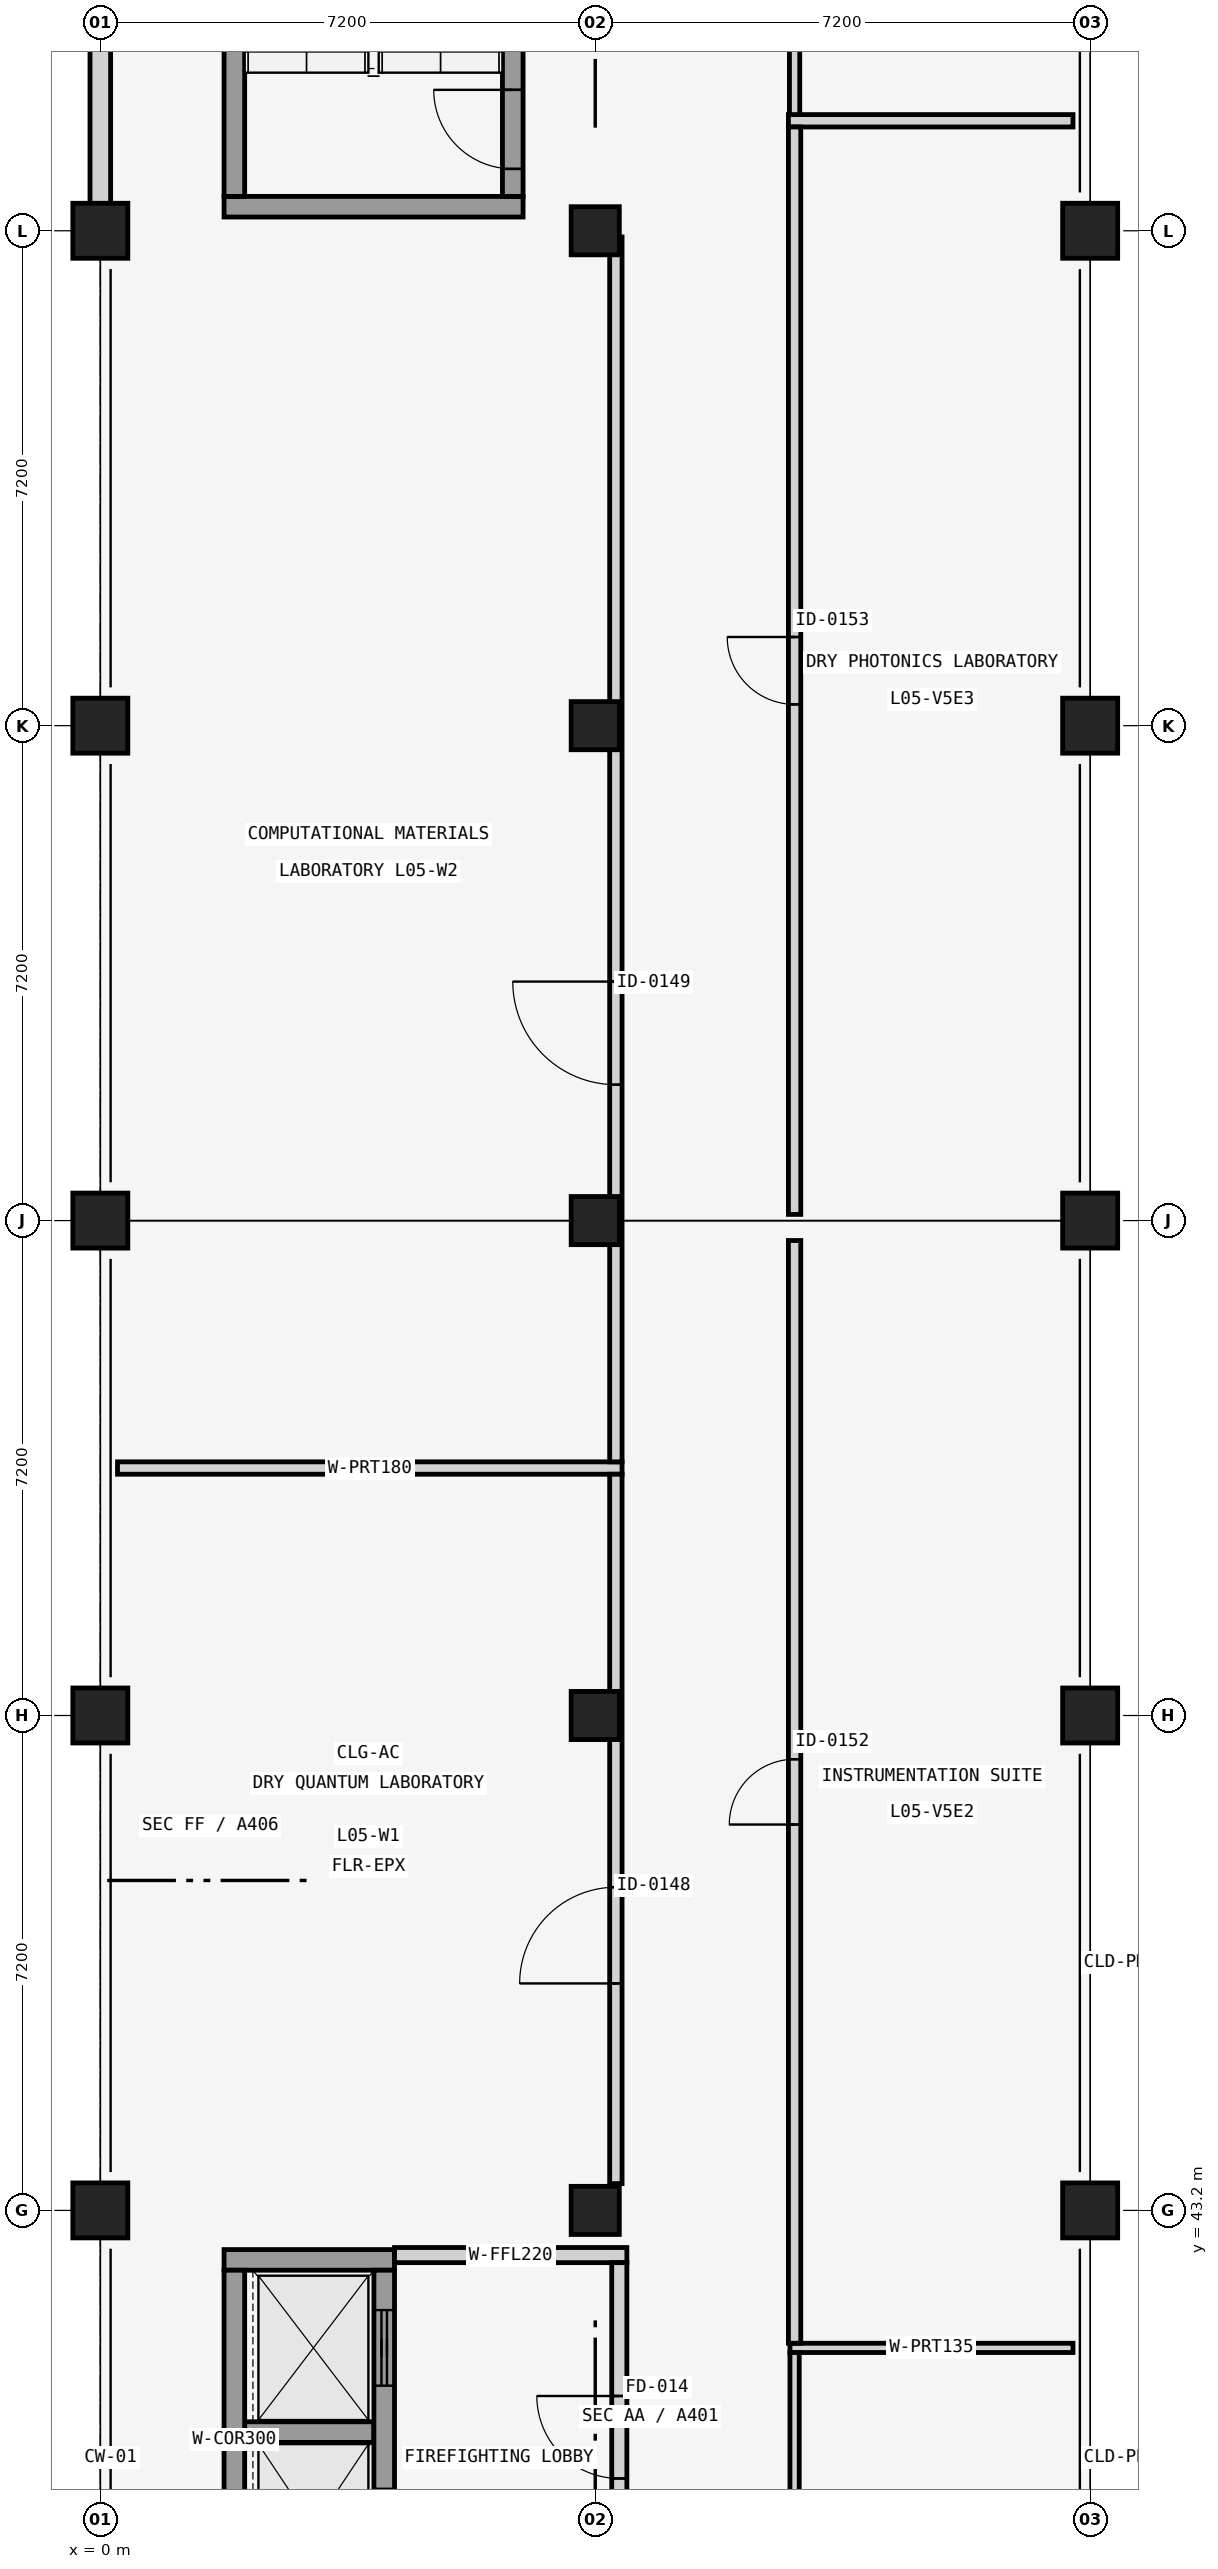
"""IFC4 building model, lengths in metres.
Left out: names, types, materials, properties, quantities, classifications, styles, units other than length and angle.
Written with IfcOpenShell. Run it as: python <this file> out.ifc"""

import sys

from ifc_helpers import new_model, si_unit, direction, frame, frame_2d, origin, origin_2d, place, context, subcontext, project, spatial, rectangle, extrude, element, fill, save


model = new_model("IFC4")
c1 = context("Model", 3, precision=1e-05, world=origin(), true_north=direction((0.0, 1.0)))
c2 = subcontext(c1, "Body", "Model", "MODEL_VIEW")
j1 = project(units=[si_unit("LENGTHUNIT", "METRE"), si_unit("PLANEANGLEUNIT", "RADIAN")], contexts=[c1])
p1 = place(None, origin())
s1 = spatial("IfcSite", under=j1, at=p1, CompositionType="ELEMENT")
p2 = place(p1, origin())
s2 = spatial("IfcBuilding", under=s1, at=p2, CompositionType="ELEMENT")
p3 = place(p2, frame((0.0, 0.0, 21.44)))
s3 = spatial("IfcBuildingStorey", under=s2, at=p3, CompositionType="ELEMENT", Elevation=21.44)
for number, where, z_axis, x_axis in (
    (1, (0.0, 43.2, 0.0), (0.0, 0.0, 1.0), (1.0, 0.0, 0.0)),
    (2, (0.0, 50.4, 0.0), (0.0, 0.0, 1.0), (1.0, 0.0, 0.0)),
    (3, (0.0, 57.6, 0.0), (0.0, 0.0, 1.0), (1.0, 0.0, 0.0)),
    (4, (0.0, 64.8, 0.0), (0.0, 0.0, 1.0), (1.0, 0.0, 0.0)),
    (5, (0.0, 72.0, 0.0), (0.0, 0.0, 1.0), (1.0, 0.0, 0.0)),
):
    element("IfcColumn", number, at=place(p3, frame(where, z_axis=z_axis, x_axis=x_axis)), inside=s3, PredefinedType="COLUMN", context=c2, shape_type="SweptSolid", body=[
        extrude(rectangle(XDim=0.8, YDim=0.8, at=origin_2d()), origin(), (0.0, 0.0, 1.0), 4.16),
    ])
for number, where, z_axis, x_axis in (
    (6, (7.2, 43.2, 0.0), (0.0, 0.0, 1.0), (1.0, 0.0, 0.0)),
    (7, (7.2, 50.4, 0.0), (0.0, 0.0, 1.0), (1.0, 0.0, 0.0)),
    (8, (7.2, 57.6, 0.0), (0.0, 0.0, 1.0), (1.0, 0.0, 0.0)),
    (9, (7.2, 64.8, 0.0), (0.0, 0.0, 1.0), (1.0, 0.0, 0.0)),
    (10, (7.2, 72.0, 0.0), (0.0, 0.0, 1.0), (1.0, 0.0, 0.0)),
):
    element("IfcColumn", number, at=place(p3, frame(where, z_axis=z_axis, x_axis=x_axis)), inside=s3, PredefinedType="COLUMN", context=c2, shape_type="SweptSolid", body=[
        extrude(rectangle(XDim=0.7, YDim=0.7, at=origin_2d()), origin(), (0.0, 0.0, 1.0), 4.16),
    ])
for number, where, z_axis, x_axis in (
    (11, (14.4, 43.2, 0.0), (0.0, 0.0, 1.0), (1.0, 0.0, 0.0)),
    (12, (14.4, 50.4, 0.0), (0.0, 0.0, 1.0), (1.0, 0.0, 0.0)),
    (13, (14.4, 57.6, 0.0), (0.0, 0.0, 1.0), (1.0, 0.0, 0.0)),
    (14, (14.4, 64.8, 0.0), (0.0, 0.0, 1.0), (1.0, 0.0, 0.0)),
    (15, (14.4, 72.0, 0.0), (0.0, 0.0, 1.0), (1.0, 0.0, 0.0)),
):
    element("IfcColumn", number, at=place(p3, frame(where, z_axis=z_axis, x_axis=x_axis)), inside=s3, PredefinedType="COLUMN", context=c2, shape_type="SweptSolid", body=[
        extrude(rectangle(XDim=0.8, YDim=0.8, at=origin_2d()), origin(), (0.0, 0.0, 1.0), 4.16),
    ])
p4 = place(p3, frame((0.0, 72.39, 0.0), z_axis=(0.0, 0.0, 1.0), x_axis=(0.0, 1.0, 0.0)))
e16 = element("IfcWall", 16, at=p4, inside=s3, PredefinedType="SOLIDWALL", context=c2, shape_type="SweptSolid", body=[
    extrude(rectangle(XDim=6.42, YDim=0.3, at=frame_2d((3.21, 0.0))), origin(), (0.0, 0.0, 1.0), 3.21),
])
p5 = place(p4, frame((2.985, 0.0, 0.65)))
e17 = element("IfcOpeningElement", 17, at=p5, cuts=e16, PredefinedType="OPENING", context=c2, shape_type="SweptSolid", body=[
    extrude(rectangle(XDim=0.45, YDim=2.4, at=frame_2d((0.225, 1.2))), frame((0.0, 0.16, 0.0), z_axis=(0.0, -1.0, 0.0), x_axis=(1.0, 0.0, 0.0)), (0.0, 0.0, 1.0), 0.32),
])
p6 = place(p3, frame((1.8, 42.48, 0.0), z_axis=(0.0, 0.0, 1.0), x_axis=(1.0, 0.0, 0.0)))
e18 = element("IfcWall", 18, at=p6, inside=s3, PredefinedType="SHEAR", context=c2, shape_type="SweptSolid", body=[
    extrude(rectangle(XDim=2.48, YDim=0.3, at=frame_2d((1.24, 0.0))), origin(), (0.0, 0.0, 1.0), 3.81),
])
p7 = place(p3, frame((2.1, 39.975, 0.0), z_axis=(0.0, 0.0, 1.0), x_axis=(1.0, 0.0, 0.0)))
e19 = element("IfcWall", 19, at=p7, inside=s3, PredefinedType="SHEAR", context=c2, shape_type="SweptSolid", body=[
    extrude(rectangle(XDim=1.88, YDim=0.3, at=frame_2d((0.94, 0.0))), origin(), (0.0, 0.0, 1.0), 3.81),
])
p8 = place(p3, frame((1.95, 37.4, 0.0), z_axis=(0.0, 0.0, 1.0), x_axis=(0.0, 1.0, 0.0)))
e20 = element("IfcWall", 20, at=p8, inside=s3, PredefinedType="SHEAR", context=c2, shape_type="SweptSolid", body=[
    extrude(rectangle(XDim=4.93, YDim=0.3, at=frame_2d((2.465, 0.0))), origin(), (0.0, 0.0, 1.0), 3.81),
])
p9 = place(p3, frame((4.13, 37.4, 0.0), z_axis=(0.0, 0.0, 1.0), x_axis=(0.0, 1.0, 0.0)))
e21 = element("IfcWall", 21, at=p9, inside=s3, PredefinedType="SHEAR", context=c2, shape_type="SweptSolid", body=[
    extrude(rectangle(XDim=4.93, YDim=0.3, at=frame_2d((2.465, 0.0))), origin(), (0.0, 0.0, 1.0), 3.81),
])
p10 = place(p9, frame((0.65, 0.0, 0.0)))
e22 = element("IfcOpeningElement", 22, at=p10, cuts=e21, PredefinedType="OPENING", context=c2, shape_type="SweptSolid", body=[
    extrude(rectangle(XDim=1.1, YDim=2.2, at=frame_2d((0.55, 1.1))), frame((0.0, 0.16, 0.0), z_axis=(0.0, -1.0, 0.0), x_axis=(1.0, 0.0, 0.0)), (0.0, 0.0, 1.0), 0.32),
])
p11 = place(p9, frame((3.25, 0.0, 0.0)))
e23 = element("IfcOpeningElement", 23, at=p11, cuts=e21, PredefinedType="OPENING", context=c2, shape_type="SweptSolid", body=[
    extrude(rectangle(XDim=1.1, YDim=2.2, at=frame_2d((0.55, 1.1))), frame((0.0, 0.16, 0.0), z_axis=(0.0, -1.0, 0.0), x_axis=(1.0, 0.0, 0.0)), (0.0, 0.0, 1.0), 0.32),
])
p12 = place(p3, frame((4.28, 42.55, 0.0), z_axis=(0.0, 0.0, 1.0), x_axis=(1.0, 0.0, 0.0)))
e24 = element("IfcWall", 24, at=p12, inside=s3, PredefinedType="SOLIDWALL", context=c2, shape_type="SweptSolid", body=[
    extrude(rectangle(XDim=3.38, YDim=0.22, at=frame_2d((1.69, 0.0))), origin(), (0.0, 0.0, 1.0), 3.01),
])
p13 = place(p3, frame((7.55, 37.36, 0.0), z_axis=(0.0, 0.0, 1.0), x_axis=(0.0, 1.0, 0.0)))
e25 = element("IfcWall", 25, at=p13, inside=s3, PredefinedType="SOLIDWALL", context=c2, shape_type="SweptSolid", body=[
    extrude(rectangle(XDim=5.08, YDim=0.22, at=frame_2d((2.54, 0.0))), origin(), (0.0, 0.0, 1.0), 3.51),
])
p14 = place(p13, frame((1.94, 0.0, 0.0)))
e26 = element("IfcOpeningElement", 26, at=p14, cuts=e25, PredefinedType="OPENING", context=c2, shape_type="SweptSolid", body=[
    extrude(rectangle(XDim=1.2, YDim=2.2, at=frame_2d((0.6, 1.1))), frame((0.0, 0.12, 0.0), z_axis=(0.0, -1.0, 0.0), x_axis=(1.0, 0.0, 0.0)), (0.0, 0.0, 1.0), 0.24),
])
p15 = place(p3, frame((1.8, 72.35, 0.0), z_axis=(0.0, 0.0, 1.0), x_axis=(1.0, 0.0, 0.0)))
e27 = element("IfcWall", 27, at=p15, inside=s3, PredefinedType="SHEAR", context=c2, shape_type="SweptSolid", body=[
    extrude(rectangle(XDim=4.35, YDim=0.3, at=frame_2d((2.175, 0.0))), origin(), (0.0, 0.0, 1.0), 3.81),
])
p16 = place(p3, frame((1.95, 72.5, 0.0), z_axis=(0.0, 0.0, 1.0), x_axis=(0.0, 1.0, 0.0)))
e28 = element("IfcWall", 28, at=p16, inside=s3, PredefinedType="SHEAR", context=c2, shape_type="SweptSolid", body=[
    extrude(rectangle(XDim=7.8, YDim=0.3, at=frame_2d((3.9, 0.0))), origin(), (0.0, 0.0, 1.0), 3.81),
])
p17 = place(p3, frame((6.0, 72.5, 0.0), z_axis=(0.0, 0.0, 1.0), x_axis=(0.0, 1.0, 0.0)))
e29 = element("IfcWall", 29, at=p17, inside=s3, PredefinedType="SHEAR", context=c2, shape_type="SweptSolid", body=[
    extrude(rectangle(XDim=7.8, YDim=0.3, at=frame_2d((3.9, 0.0))), origin(), (0.0, 0.0, 1.0), 3.81),
])
p18 = place(p17, frame((0.4, 0.0, 0.0)))
e30 = element("IfcOpeningElement", 30, at=p18, cuts=e29, PredefinedType="OPENING", context=c2, shape_type="SweptSolid", body=[
    extrude(rectangle(XDim=1.15, YDim=2.2, at=frame_2d((0.575, 1.1))), frame((0.0, 0.16, 0.0), z_axis=(0.0, -1.0, 0.0), x_axis=(1.0, 0.0, 0.0)), (0.0, 0.0, 1.0), 0.32),
])
p19 = place(p3, frame((0.25, 54.0, 0.0), z_axis=(0.0, 0.0, 1.0), x_axis=(1.0, 0.0, 0.0)))
e31 = element("IfcWall", 31, at=p19, inside=s3, PredefinedType="PARTITIONING", context=c2, shape_type="SweptSolid", body=[
    extrude(rectangle(XDim=7.34, YDim=0.18, at=frame_2d((3.67, 0.0))), origin(), (0.0, 0.0, 1.0), 3.01),
])
p20 = place(p3, frame((7.5, 43.59, 0.0), z_axis=(0.0, 0.0, 1.0), x_axis=(0.0, 1.0, 0.0)))
e32 = element("IfcWall", 32, at=p20, inside=s3, PredefinedType="PARTITIONING", context=c2, shape_type="SweptSolid", body=[
    extrude(rectangle(XDim=10.32, YDim=0.18, at=frame_2d((5.16, 0.0))), origin(), (0.0, 0.0, 1.0), 3.21),
])
p21 = place(p20, frame((2.912, 0.0, 0.0)))
e33 = element("IfcOpeningElement", 33, at=p21, cuts=e32, PredefinedType="OPENING", context=c2, shape_type="SweptSolid", body=[
    extrude(rectangle(XDim=1.4, YDim=2.2, at=frame_2d((0.7, 1.1))), frame((0.0, 0.1, 0.0), z_axis=(0.0, -1.0, 0.0), x_axis=(1.0, 0.0, 0.0)), (0.0, 0.0, 1.0), 0.2),
])
p22 = place(p3, frame((7.5, 54.09, 0.0), z_axis=(0.0, 0.0, 1.0), x_axis=(0.0, 1.0, 0.0)))
e34 = element("IfcWall", 34, at=p22, inside=s3, PredefinedType="PARTITIONING", context=c2, shape_type="SweptSolid", body=[
    extrude(rectangle(XDim=17.82, YDim=0.18, at=frame_2d((8.91, 0.0))), origin(), (0.0, 0.0, 1.0), 3.21),
])
p23 = place(p22, frame((5.487, 0.0, 0.0)))
e35 = element("IfcOpeningElement", 35, at=p23, cuts=e34, PredefinedType="OPENING", context=c2, shape_type="SweptSolid", body=[
    extrude(rectangle(XDim=1.5, YDim=2.2, at=frame_2d((0.75, 1.1))), frame((0.0, 0.1, 0.0), z_axis=(0.0, -1.0, 0.0), x_axis=(1.0, 0.0, 0.0)), (0.0, 0.0, 1.0), 0.2),
])
p24 = place(p3, frame((10.032, 41.2, 0.0), z_axis=(0.0, 0.0, 1.0), x_axis=(1.0, 0.0, 0.0)))
e36 = element("IfcWall", 36, at=p24, inside=s3, PredefinedType="PARTITIONING", context=c2, shape_type="SweptSolid", body=[
    extrude(rectangle(XDim=4.117, YDim=0.135, at=frame_2d((2.059, 0.0))), origin(), (0.0, 0.0, 1.0), 3.81),
])
p25 = place(p3, frame((10.1, 25.468, 0.0), z_axis=(0.0, 0.0, 1.0), x_axis=(0.0, 1.0, 0.0)))
e37 = element("IfcWall", 37, at=p25, inside=s3, PredefinedType="PARTITIONING", context=c2, shape_type="SweptSolid", body=[
    extrude(rectangle(XDim=15.665, YDim=0.135, at=frame_2d((7.833, 0.0))), origin(), (0.0, 0.0, 1.0), 3.21),
])
p26 = place(p25, frame((7.373, 0.0, 0.0)))
e38 = element("IfcOpeningElement", 38, at=p26, cuts=e37, PredefinedType="OPENING", context=c2, shape_type="SweptSolid", body=[
    extrude(rectangle(XDim=0.92, YDim=2.1, at=frame_2d((0.46, 1.05))), frame((0.0, 0.078, 0.0), z_axis=(0.0, -1.0, 0.0), x_axis=(1.0, 0.0, 0.0)), (0.0, 0.0, 1.0), 0.155),
])
p27 = place(p3, frame((10.1, 41.268, 0.0), z_axis=(0.0, 0.0, 1.0), x_axis=(0.0, 1.0, 0.0)))
e39 = element("IfcWall", 39, at=p27, inside=s3, PredefinedType="PARTITIONING", context=c2, shape_type="SweptSolid", body=[
    extrude(rectangle(XDim=16.042, YDim=0.18, at=frame_2d((8.021, 0.0))), origin(), (0.0, 0.0, 1.0), 3.21),
])
p28 = place(p27, frame((7.546, 0.0, 0.0)))
e40 = element("IfcOpeningElement", 40, at=p28, cuts=e39, PredefinedType="OPENING", context=c2, shape_type="SweptSolid", body=[
    extrude(rectangle(XDim=0.95, YDim=2.1, at=frame_2d((0.475, 1.05))), frame((0.0, 0.1, 0.0), z_axis=(0.0, -1.0, 0.0), x_axis=(1.0, 0.0, 0.0)), (0.0, 0.0, 1.0), 0.2),
])
p29 = place(p3, frame((10.01, 73.6, 0.0), z_axis=(0.0, 0.0, 1.0), x_axis=(1.0, 0.0, 0.0)))
e41 = element("IfcWall", 41, at=p29, inside=s3, PredefinedType="PARTITIONING", context=c2, shape_type="SweptSolid", body=[
    extrude(rectangle(XDim=4.14, YDim=0.18, at=frame_2d((2.07, 0.0))), origin(), (0.0, 0.0, 1.0), 3.21),
])
p30 = place(p3, frame((10.1, 57.69, 0.0), z_axis=(0.0, 0.0, 1.0), x_axis=(0.0, 1.0, 0.0)))
e42 = element("IfcWall", 42, at=p30, inside=s3, PredefinedType="PARTITIONING", context=c2, shape_type="SweptSolid", body=[
    extrude(rectangle(XDim=15.82, YDim=0.18, at=frame_2d((7.91, 0.0))), origin(), (0.0, 0.0, 1.0), 3.21),
])
p31 = place(p30, frame((7.42, 0.0, 0.0)))
e43 = element("IfcOpeningElement", 43, at=p31, cuts=e42, PredefinedType="OPENING", context=c2, shape_type="SweptSolid", body=[
    extrude(rectangle(XDim=0.98, YDim=2.1, at=frame_2d((0.49, 1.05))), frame((0.0, 0.1, 0.0), z_axis=(0.0, -1.0, 0.0), x_axis=(1.0, 0.0, 0.0)), (0.0, 0.0, 1.0), 0.2),
])
p32 = place(p3, frame((10.1, 73.69, 0.0), z_axis=(0.0, 0.0, 1.0), x_axis=(0.0, 1.0, 0.0)))
e44 = element("IfcWall", 44, at=p32, inside=s3, PredefinedType="PARTITIONING", context=c2, shape_type="SweptSolid", body=[
    extrude(rectangle(XDim=12.335, YDim=0.15, at=frame_2d((6.167, 0.0))), origin(), (0.0, 0.0, 1.0), 3.81),
])
p33 = place(p32, frame((5.667, 0.0, 0.0)))
e45 = element("IfcOpeningElement", 45, at=p33, cuts=e44, PredefinedType="OPENING", context=c2, shape_type="SweptSolid", body=[
    extrude(rectangle(XDim=1.0, YDim=2.1, at=frame_2d((0.5, 1.05))), frame((0.0, 0.085, 0.0), z_axis=(0.0, -1.0, 0.0), x_axis=(1.0, 0.0, 0.0)), (0.0, 0.0, 1.0), 0.17),
])
p34 = place(p11, origin())
e46 = element("IfcDoor", 46, at=p34, inside=s3, OperationType="SLIDING_TO_LEFT", PredefinedType="DOOR", context=c2, shape_type="SweptSolid", body=[
    extrude(rectangle(XDim=1.1, YDim=2.2, at=frame_2d((0.55, 1.1))), frame((0.0, 0.025, 0.0), z_axis=(0.0, -1.0, 0.0), x_axis=(1.0, 0.0, 0.0)), (0.0, 0.0, 1.0), 0.05),
])
fill(e23, e46)
p35 = place(p14, origin())
e47 = element("IfcDoor", 47, at=p35, inside=s3, OperationType="SINGLE_SWING_RIGHT", PredefinedType="DOOR", context=c2, shape_type="SweptSolid", body=[
    extrude(rectangle(XDim=1.2, YDim=2.2, at=frame_2d((0.6, 1.1))), frame((0.0, 0.025, 0.0), z_axis=(0.0, -1.0, 0.0), x_axis=(1.0, 0.0, 0.0)), (0.0, 0.0, 1.0), 0.05),
])
fill(e26, e47)
p36 = place(p18, origin())
e48 = element("IfcDoor", 48, at=p36, inside=s3, OperationType="SINGLE_SWING_RIGHT", PredefinedType="DOOR", context=c2, shape_type="SweptSolid", body=[
    extrude(rectangle(XDim=1.15, YDim=2.2, at=frame_2d((0.575, 1.1))), frame((0.0, 0.025, 0.0), z_axis=(0.0, -1.0, 0.0), x_axis=(1.0, 0.0, 0.0)), (0.0, 0.0, 1.0), 0.05),
])
fill(e30, e48)
p37 = place(p21, origin())
e49 = element("IfcDoor", 49, at=p37, inside=s3, OperationType="SINGLE_SWING_LEFT", PredefinedType="DOOR", context=c2, shape_type="SweptSolid", body=[
    extrude(rectangle(XDim=1.4, YDim=2.2, at=frame_2d((0.7, 1.1))), frame((0.0, 0.025, 0.0), z_axis=(0.0, -1.0, 0.0), x_axis=(1.0, 0.0, 0.0)), (0.0, 0.0, 1.0), 0.05),
])
fill(e33, e49)
p38 = place(p23, origin())
e50 = element("IfcDoor", 50, at=p38, inside=s3, OperationType="SINGLE_SWING_RIGHT", PredefinedType="DOOR", context=c2, shape_type="SweptSolid", body=[
    extrude(rectangle(XDim=1.5, YDim=2.2, at=frame_2d((0.75, 1.1))), frame((0.0, 0.025, 0.0), z_axis=(0.0, -1.0, 0.0), x_axis=(1.0, 0.0, 0.0)), (0.0, 0.0, 1.0), 0.05),
])
fill(e35, e50)
p39 = place(p28, origin())
e51 = element("IfcDoor", 51, at=p39, inside=s3, OperationType="SINGLE_SWING_LEFT", PredefinedType="DOOR", context=c2, shape_type="SweptSolid", body=[
    extrude(rectangle(XDim=0.95, YDim=2.1, at=frame_2d((0.475, 1.05))), frame((0.0, 0.025, 0.0), z_axis=(0.0, -1.0, 0.0), x_axis=(1.0, 0.0, 0.0)), (0.0, 0.0, 1.0), 0.05),
])
fill(e40, e51)
p40 = place(p31, origin())
e52 = element("IfcDoor", 52, at=p40, inside=s3, OperationType="SINGLE_SWING_RIGHT", PredefinedType="DOOR", context=c2, shape_type="SweptSolid", body=[
    extrude(rectangle(XDim=0.98, YDim=2.1, at=frame_2d((0.49, 1.05))), frame((0.0, 0.025, 0.0), z_axis=(0.0, -1.0, 0.0), x_axis=(1.0, 0.0, 0.0)), (0.0, 0.0, 1.0), 0.05),
])
fill(e43, e52)
save(model, sys.argv[1])
